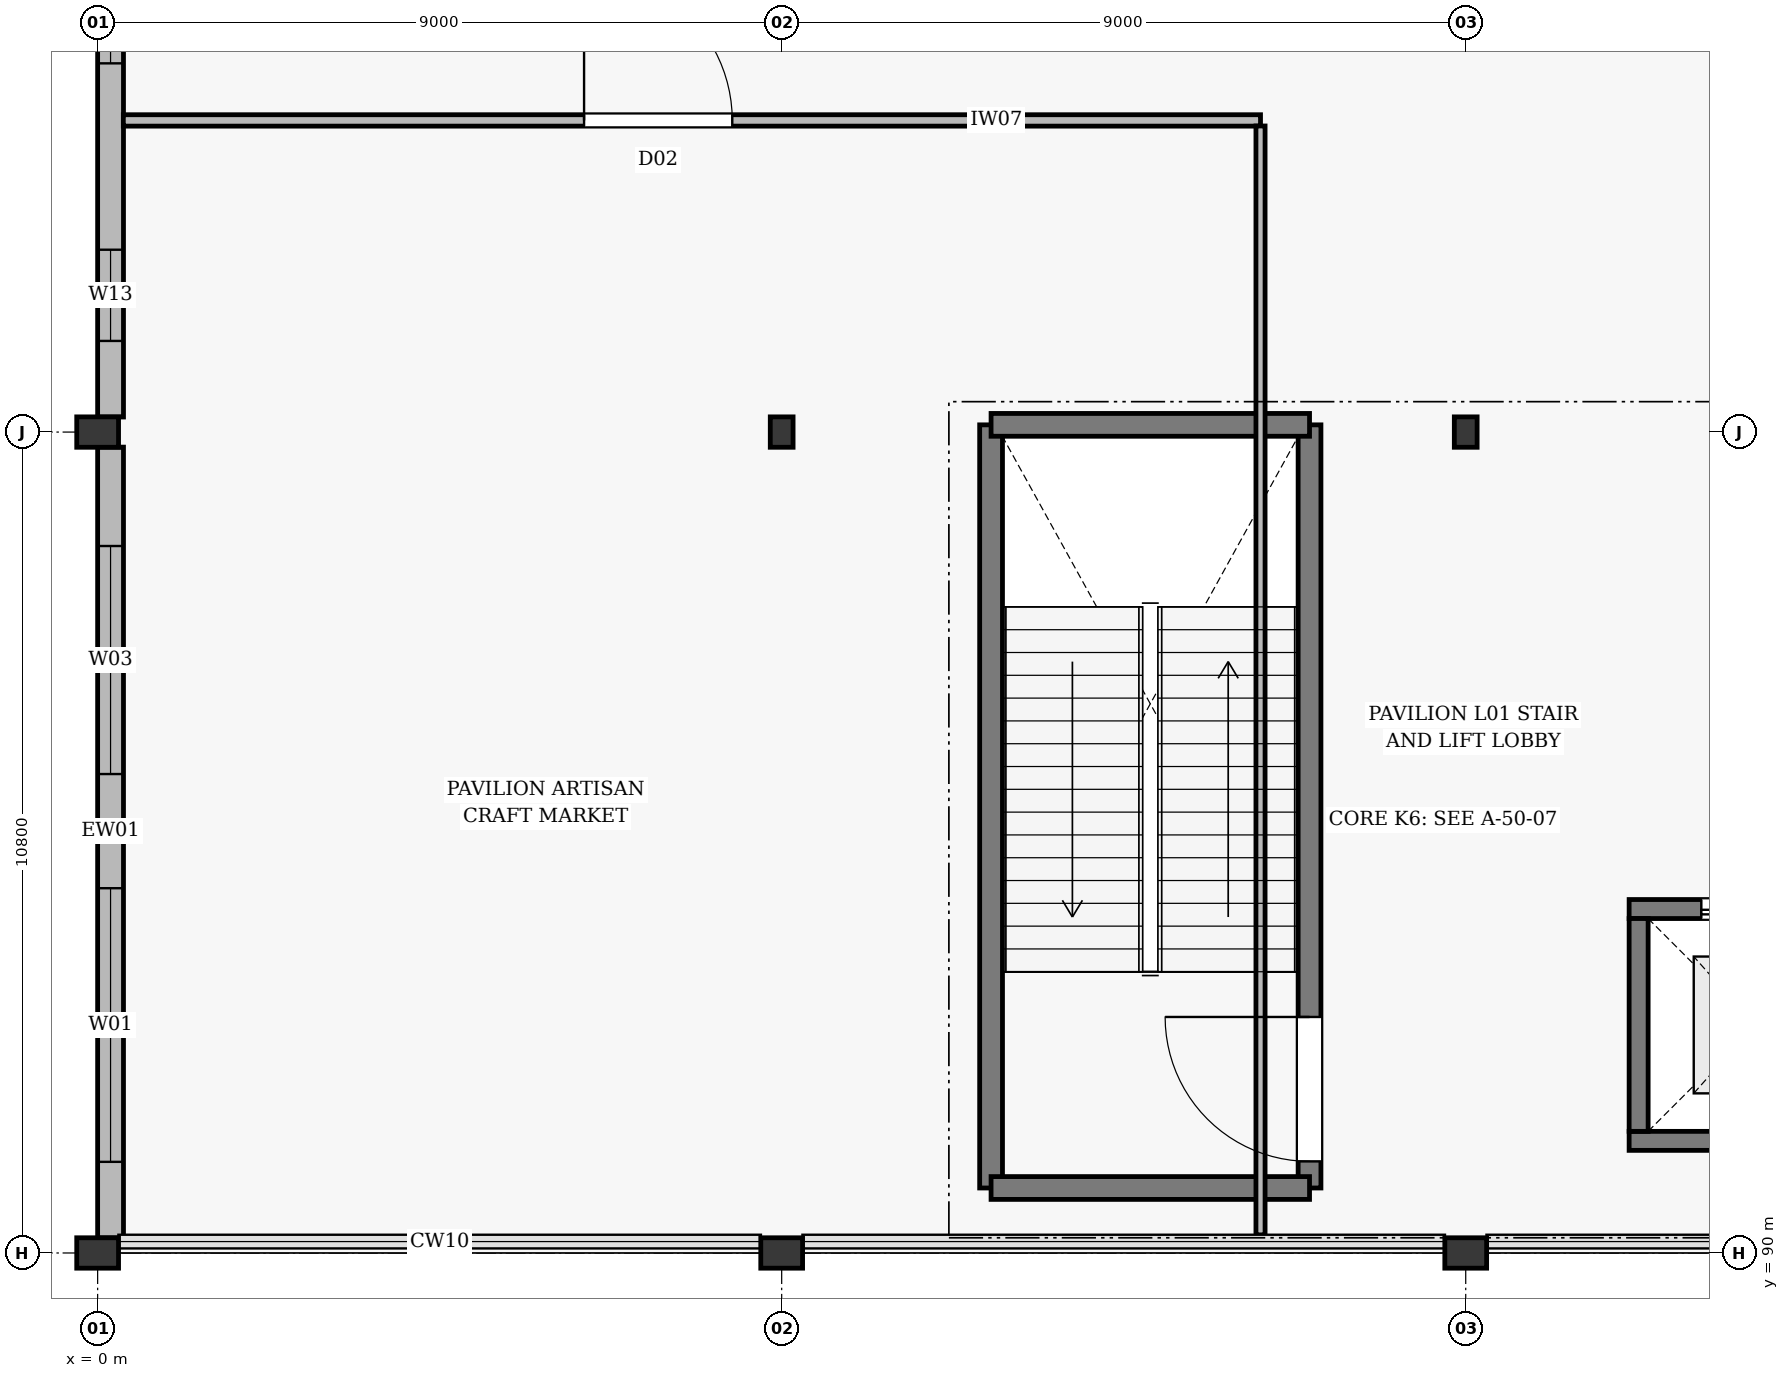
"""IFC4 building model, lengths in metres.
Left out: names, types, materials, properties, quantities, classifications, styles, units other than length and angle.
Written with IfcOpenShell. Run it as: python <this file> out.ifc"""

import sys

from ifc_helpers import new_model, si_unit, direction, frame, frame_2d, origin, origin_2d, place, context, subcontext, project, spatial, rectangle, i_section, extrude, element, fill, save


model = new_model("IFC4")
c1 = context("Model", 3, precision=1e-05, world=origin(), true_north=direction((0.0, 1.0)))
c2 = subcontext(c1, "Body", "Model", "MODEL_VIEW")
j1 = project(units=[si_unit("LENGTHUNIT", "METRE"), si_unit("PLANEANGLEUNIT", "RADIAN")], contexts=[c1])
p1 = place(None, origin())
s1 = spatial("IfcSite", under=j1, at=p1, CompositionType="ELEMENT")
p2 = place(p1, origin())
s2 = spatial("IfcBuilding", under=s1, at=p2, CompositionType="ELEMENT")
p3 = place(p2, frame((0.0, 0.0, 6.6)))
s3 = spatial("IfcBuildingStorey", under=s2, at=p3, CompositionType="ELEMENT", Elevation=6.6)
for number, where, z_axis, x_axis in (
    (1, (0.0, 90.0, 0.0), (0.0, 0.0, 1.0), (1.0, 0.0, 0.0)),
    (2, (0.0, 100.8, 0.0), (0.0, 0.0, 1.0), (1.0, 0.0, 0.0)),
    (3, (9.0, 90.0, 0.0), (0.0, 0.0, 1.0), (1.0, 0.0, 0.0)),
):
    element("IfcColumn", number, at=place(p3, frame(where, z_axis=z_axis, x_axis=x_axis)), inside=s3, PredefinedType="PILASTER", context=c2, shape_type="SweptSolid", body=[
        extrude(rectangle(XDim=0.55, YDim=0.4, at=origin_2d()), origin(), (0.0, 0.0, 1.0), 6.0),
    ])
p4 = place(p3, frame((9.0, 100.8, 0.0), z_axis=(0.0, 0.0, 1.0), x_axis=(1.0, 0.0, 0.0)))
e4 = element("IfcColumn", 4, at=p4, inside=s3, PredefinedType="COLUMN", context=c2, shape_type="SweptSolid", body=[
    extrude(i_section(OverallWidth=0.3, OverallDepth=0.4, WebThickness=0.013, FlangeThickness=0.024, at=origin_2d()), origin(), (0.0, 0.0, 1.0), 6.0),
])
p5 = place(p3, frame((18.0, 90.0, 0.0), z_axis=(0.0, 0.0, 1.0), x_axis=(1.0, 0.0, 0.0)))
e5 = element("IfcColumn", 5, at=p5, inside=s3, PredefinedType="PILASTER", context=c2, shape_type="SweptSolid", body=[
    extrude(rectangle(XDim=0.55, YDim=0.4, at=origin_2d()), origin(), (0.0, 0.0, 1.0), 6.0),
])
p6 = place(p3, frame((18.0, 100.8, 0.0), z_axis=(0.0, 0.0, 1.0), x_axis=(1.0, 0.0, 0.0)))
e6 = element("IfcColumn", 6, at=p6, inside=s3, PredefinedType="COLUMN", context=c2, shape_type="SweptSolid", body=[
    extrude(i_section(OverallWidth=0.3, OverallDepth=0.4, WebThickness=0.013, FlangeThickness=0.024, at=origin_2d()), origin(), (0.0, 0.0, 1.0), 6.0),
])
p7 = place(p3, frame((0.17, 90.198, 0.0), z_axis=(0.0, 0.0, 1.0), x_axis=(0.0, 1.0, 0.0)))
e7 = element("IfcWall", 7, at=p7, inside=s3, PredefinedType="STANDARD", context=c2, shape_type="SweptSolid", body=[
    extrude(rectangle(XDim=10.404, YDim=0.34, at=frame_2d((5.202, 0.0))), origin(), (0.0, 0.0, 1.0), 5.25),
])
p8 = place(p7, frame((1.001, 0.0, 0.75)))
e8 = element("IfcOpeningElement", 8, at=p8, cuts=e7, PredefinedType="OPENING", context=c2, shape_type="SweptSolid", body=[
    extrude(rectangle(XDim=3.6, YDim=2.8, at=frame_2d((1.8, 1.4))), frame((0.0, 0.182, 0.0), z_axis=(0.0, -1.0, 0.0), x_axis=(1.0, 0.0, 0.0)), (0.0, 0.0, 1.0), 0.364),
])
p9 = place(p7, frame((6.103, 0.0, 0.75)))
e9 = element("IfcOpeningElement", 9, at=p9, cuts=e7, PredefinedType="OPENING", context=c2, shape_type="SweptSolid", body=[
    extrude(rectangle(XDim=3.0, YDim=2.6, at=frame_2d((1.5, 1.3))), frame((0.0, 0.182, 0.0), z_axis=(0.0, -1.0, 0.0), x_axis=(1.0, 0.0, 0.0)), (0.0, 0.0, 1.0), 0.364),
])
p10 = place(p3, frame((0.17, 100.998, 0.0), z_axis=(0.0, 0.0, 1.0), x_axis=(0.0, 1.0, 0.0)))
e10 = element("IfcWall", 10, at=p10, inside=s3, PredefinedType="STANDARD", context=c2, shape_type="SweptSolid", body=[
    extrude(rectangle(XDim=10.404, YDim=0.34, at=frame_2d((5.202, 0.0))), origin(), (0.0, 0.0, 1.0), 5.25),
])
p11 = place(p10, frame((1.001, 0.0, 0.75)))
e11 = element("IfcOpeningElement", 11, at=p11, cuts=e10, PredefinedType="OPENING", context=c2, shape_type="SweptSolid", body=[
    extrude(rectangle(XDim=1.2, YDim=1.8, at=frame_2d((0.6, 0.9))), frame((0.0, 0.182, 0.0), z_axis=(0.0, -1.0, 0.0), x_axis=(1.0, 0.0, 0.0)), (0.0, 0.0, 1.0), 0.364),
])
p12 = place(p10, frame((4.653, 0.0, 0.75)))
e12 = element("IfcOpeningElement", 12, at=p12, cuts=e10, PredefinedType="OPENING", context=c2, shape_type="SweptSolid", body=[
    extrude(rectangle(XDim=3.0, YDim=2.6, at=frame_2d((1.5, 1.3))), frame((0.0, 0.182, 0.0), z_axis=(0.0, -1.0, 0.0), x_axis=(1.0, 0.0, 0.0)), (0.0, 0.0, 1.0), 0.364),
])
p13 = place(p3, frame((15.945, 90.855, 0.0), z_axis=(0.0, 0.0, 1.0), x_axis=(0.0, 1.0, 0.0)))
e13 = element("IfcWall", 13, at=p13, inside=s3, PredefinedType="SOLIDWALL", context=c2, shape_type="SweptSolid", body=[
    extrude(rectangle(XDim=10.04, YDim=0.3, at=frame_2d((5.02, 0.0))), origin(), (0.0, 0.0, 1.0), 6.0),
])
p14 = place(p13, frame((0.35, 0.0, 0.005)))
e14 = element("IfcOpeningElement", 14, at=p14, cuts=e13, PredefinedType="OPENING", context=c2, shape_type="SweptSolid", body=[
    extrude(rectangle(XDim=1.9, YDim=2.2, at=frame_2d((0.95, 1.1))), frame((0.0, 0.162, 0.0), z_axis=(0.0, -1.0, 0.0), x_axis=(1.0, 0.0, 0.0)), (0.0, 0.0, 1.0), 0.324),
])
p15 = place(p3, frame((11.755, 90.855, 0.0), z_axis=(0.0, 0.0, 1.0), x_axis=(0.0, 1.0, 0.0)))
e15 = element("IfcWall", 15, at=p15, inside=s3, PredefinedType="SOLIDWALL", context=c2, shape_type="SweptSolid", body=[
    extrude(rectangle(XDim=10.04, YDim=0.3, at=frame_2d((5.02, 0.0))), origin(), (0.0, 0.0, 1.0), 6.0),
])
for number, where, z_axis, x_axis in (
    (16, (15.945, 90.855, 0.0), (0.0, 0.0, 1.0), (-1.0, 0.0, 0.0)),
    (17, (15.945, 100.895, 0.0), (0.0, 0.0, 1.0), (-1.0, 0.0, 0.0)),
):
    element("IfcWall", number, at=place(p3, frame(where, z_axis=z_axis, x_axis=x_axis)), inside=s3, PredefinedType="SOLIDWALL", context=c2, shape_type="SweptSolid", body=[
        extrude(rectangle(XDim=4.19, YDim=0.3, at=frame_2d((2.095, 0.0))), origin(), (0.0, 0.0, 1.0), 6.0),
    ])
p16 = place(p3, frame((20.15, 91.475, 0.0), z_axis=(0.0, 0.0, 1.0), x_axis=(1.0, 0.0, 0.0)))
e18 = element("IfcWall", 18, at=p16, inside=s3, PredefinedType="SOLIDWALL", context=c2, shape_type="SweptSolid", body=[
    extrude(rectangle(XDim=3.3, YDim=0.25, at=frame_2d((1.65, 0.0))), origin(), (0.0, 0.0, 1.0), 6.0),
])
p17 = place(p3, frame((20.15, 94.525, 0.0), z_axis=(0.0, 0.0, 1.0), x_axis=(1.0, 0.0, 0.0)))
e19 = element("IfcWall", 19, at=p17, inside=s3, PredefinedType="SOLIDWALL", context=c2, shape_type="SweptSolid", body=[
    extrude(rectangle(XDim=3.3, YDim=0.25, at=frame_2d((1.65, 0.0))), origin(), (0.0, 0.0, 1.0), 6.0),
])
p18 = place(p17, frame((0.95, 0.0, 0.005)))
e20 = element("IfcOpeningElement", 20, at=p18, cuts=e19, PredefinedType="OPENING", context=c2, shape_type="SweptSolid", body=[
    extrude(rectangle(XDim=1.4, YDim=2.25, at=frame_2d((0.7, 1.125))), frame((0.0, 0.137, 0.0), z_axis=(0.0, -1.0, 0.0), x_axis=(1.0, 0.0, 0.0)), (0.0, 0.0, 1.0), 0.274),
])
p19 = place(p3, frame((20.275, 91.6, 0.0), z_axis=(0.0, 0.0, 1.0), x_axis=(0.0, 1.0, 0.0)))
e21 = element("IfcWall", 21, at=p19, inside=s3, PredefinedType="SOLIDWALL", context=c2, shape_type="SweptSolid", body=[
    extrude(rectangle(XDim=2.8, YDim=0.25, at=frame_2d((1.4, 0.0))), origin(), (0.0, 0.0, 1.0), 6.0),
])
p20 = place(p3, frame((0.338, 104.9, 0.0), z_axis=(0.0, 0.0, 1.0), x_axis=(1.0, 0.0, 0.0)))
e22 = element("IfcWall", 22, at=p20, inside=s3, PredefinedType="PARTITIONING", context=c2, shape_type="SweptSolid", body=[
    extrude(rectangle(XDim=14.962, YDim=0.15, at=frame_2d((7.481, 0.0))), origin(), (0.0, 0.0, 1.0), 5.29),
])
p21 = place(p20, frame((6.062, 0.0, 0.005)))
e23 = element("IfcOpeningElement", 23, at=p21, cuts=e22, PredefinedType="OPENING", context=c2, shape_type="SweptSolid", body=[
    extrude(rectangle(XDim=1.95, YDim=2.3, at=frame_2d((0.975, 1.15))), frame((0.0, 0.087, 0.0), z_axis=(0.0, -1.0, 0.0), x_axis=(1.0, 0.0, 0.0)), (0.0, 0.0, 1.0), 0.174),
])
p22 = place(p3, frame((15.3, 90.238, 0.0), z_axis=(0.0, 0.0, 1.0), x_axis=(0.0, 1.0, 0.0)))
e24 = element("IfcWall", 24, at=p22, inside=s3, PredefinedType="PARTITIONING", context=c2, shape_type="SweptSolid", body=[
    extrude(rectangle(XDim=14.589, YDim=0.12, at=frame_2d((7.294, 0.0))), origin(), (0.0, 0.0, 1.0), 5.24),
])
p23 = place(p8, origin())
e25 = element("IfcWindow", 25, at=p23, inside=s3, PartitioningType="DOUBLE_PANEL_VERTICAL", PredefinedType="WINDOW", context=c2, shape_type="SweptSolid", body=[
    extrude(rectangle(XDim=3.6, YDim=2.8, at=frame_2d((1.8, 1.4))), frame((0.0, 0.03, 0.0), z_axis=(0.0, -1.0, 0.0), x_axis=(1.0, 0.0, 0.0)), (0.0, 0.0, 1.0), 0.06),
])
fill(e8, e25)
p24 = place(p9, origin())
e26 = element("IfcWindow", 26, at=p24, inside=s3, PartitioningType="DOUBLE_PANEL_VERTICAL", PredefinedType="WINDOW", context=c2, shape_type="SweptSolid", body=[
    extrude(rectangle(XDim=3.0, YDim=2.6, at=frame_2d((1.5, 1.3))), frame((0.0, 0.03, 0.0), z_axis=(0.0, -1.0, 0.0), x_axis=(1.0, 0.0, 0.0)), (0.0, 0.0, 1.0), 0.06),
])
fill(e9, e26)
p25 = place(p11, origin())
e27 = element("IfcWindow", 27, at=p25, inside=s3, PartitioningType="DOUBLE_PANEL_VERTICAL", PredefinedType="WINDOW", context=c2, shape_type="SweptSolid", body=[
    extrude(rectangle(XDim=1.2, YDim=1.8, at=frame_2d((0.6, 0.9))), frame((0.0, 0.03, 0.0), z_axis=(0.0, -1.0, 0.0), x_axis=(1.0, 0.0, 0.0)), (0.0, 0.0, 1.0), 0.06),
])
fill(e11, e27)
p26 = place(p12, origin())
e28 = element("IfcWindow", 28, at=p26, inside=s3, PartitioningType="DOUBLE_PANEL_VERTICAL", PredefinedType="WINDOW", context=c2, shape_type="SweptSolid", body=[
    extrude(rectangle(XDim=3.0, YDim=2.6, at=frame_2d((1.5, 1.3))), frame((0.0, 0.03, 0.0), z_axis=(0.0, -1.0, 0.0), x_axis=(1.0, 0.0, 0.0)), (0.0, 0.0, 1.0), 0.06),
])
fill(e12, e28)
p27 = place(p14, origin())
e29 = element("IfcDoor", 29, at=p27, inside=s3, OperationType="SINGLE_SWING_RIGHT", PredefinedType="DOOR", context=c2, shape_type="SweptSolid", body=[
    extrude(rectangle(XDim=1.9, YDim=2.2, at=frame_2d((0.95, 1.1))), frame((0.0, 0.025, 0.0), z_axis=(0.0, -1.0, 0.0), x_axis=(1.0, 0.0, 0.0)), (0.0, 0.0, 1.0), 0.05),
])
fill(e14, e29)
p28 = place(p18, origin())
e30 = element("IfcDoor", 30, at=p28, inside=s3, OperationType="SLIDING_TO_LEFT", PredefinedType="DOOR", context=c2, shape_type="SweptSolid", body=[
    extrude(rectangle(XDim=1.4, YDim=2.25, at=frame_2d((0.7, 1.125))), frame((0.0, 0.025, 0.0), z_axis=(0.0, -1.0, 0.0), x_axis=(1.0, 0.0, 0.0)), (0.0, 0.0, 1.0), 0.05),
])
fill(e20, e30)
p29 = place(p21, origin())
e31 = element("IfcDoor", 31, at=p29, inside=s3, OperationType="DOUBLE_DOOR_SINGLE_SWING", PredefinedType="DOOR", context=c2, shape_type="SweptSolid", body=[
    extrude(rectangle(XDim=1.95, YDim=2.3, at=frame_2d((0.975, 1.15))), frame((0.0, 0.025, 0.0), z_axis=(0.0, -1.0, 0.0), x_axis=(1.0, 0.0, 0.0)), (0.0, 0.0, 1.0), 0.05),
])
fill(e23, e31)
save(model, sys.argv[1])
